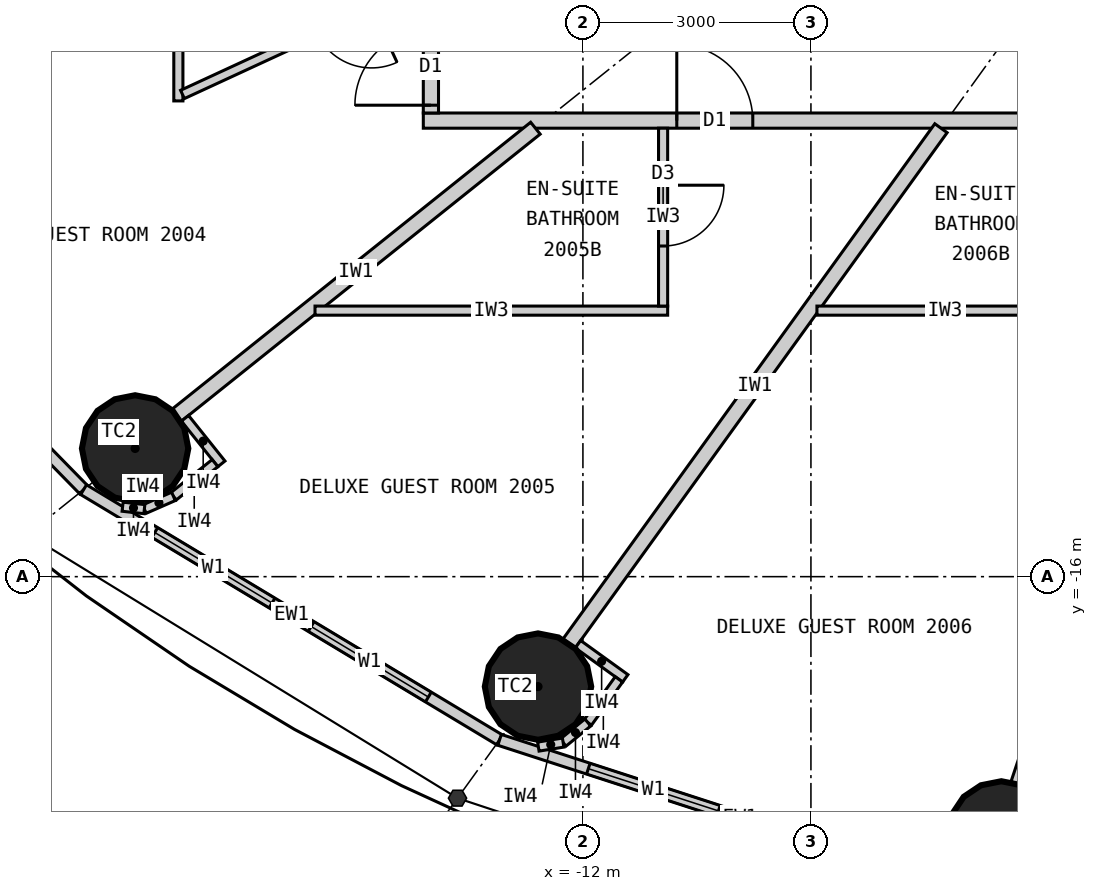
"""IFC4 building model, lengths in metres.
Left out: names, types, materials, properties, quantities, classifications, styles, units other than length and angle.
Written with IfcOpenShell. Run it as: python <this file> out.ifc"""

import sys

from ifc_helpers import new_model, si_unit, direction, frame, frame_2d, origin, origin_2d, place, context, subcontext, project, spatial, rectangle, circle, extrude, element, fill, save


model = new_model("IFC4")
c1 = context("Model", 3, precision=1e-05, world=origin(), true_north=direction((0.0, 1.0)))
c2 = subcontext(c1, "Body", "Model", "MODEL_VIEW")
j1 = project(units=[si_unit("LENGTHUNIT", "METRE"), si_unit("PLANEANGLEUNIT", "RADIAN")], contexts=[c1])
p1 = place(None, origin())
s1 = spatial("IfcSite", under=j1, at=p1, CompositionType="ELEMENT")
p2 = place(p1, origin())
s2 = spatial("IfcBuilding", under=s1, at=p2, CompositionType="ELEMENT")
p3 = place(p2, frame((0.0, 0.0, 80.4)))
s3 = spatial("IfcBuildingStorey", under=s2, at=p3, CompositionType="ELEMENT", Elevation=80.4)
for number, where, z_axis, x_axis in (
    (1, (-17.892, -14.313, 0.0), (0.0, 0.0, 1.0), (1.0, 0.0, 0.0)),
    (2, (-12.591, -17.447, 0.0), (0.0, 0.0, 1.0), (1.0, 0.0, 0.0)),
    (3, (-6.495, -19.391, 0.0), (0.0, 0.0, 1.0), (1.0, 0.0, 0.0)),
):
    element("IfcColumn", number, at=place(p3, frame(where, z_axis=z_axis, x_axis=x_axis)), inside=s3, PredefinedType="COLUMN", context=c2, shape_type="SweptSolid", body=[
        extrude(circle(Radius=0.7, at=origin_2d()), origin(), (0.0, 0.0, 1.0), 3.3),
    ])
p4 = place(p3, frame((-22.803, -10.532, 0.0), z_axis=(0.0, 0.0, 1.0), x_axis=(0.699602905915, -0.714531856557, 0.0)))
e4 = element("IfcWall", 4, at=p4, inside=s3, PredefinedType="ELEMENTEDWALL", context=c2, shape_type="SweptSolid", body=[
    extrude(rectangle(XDim=6.051, YDim=0.15, at=frame_2d((3.025, 0.0))), origin(), (0.0, 0.0, 1.0), 3.12),
])
p5 = place(p4, frame((0.926, 0.0, 0.9)))
e5 = element("IfcOpeningElement", 5, at=p5, cuts=e4, PredefinedType="OPENING", context=c2, shape_type="SweptSolid", body=[
    extrude(rectangle(XDim=1.8, YDim=1.9, at=frame_2d((0.9, 0.95))), frame((0.0, 0.085, 0.0), z_axis=(0.0, -1.0, 0.0), x_axis=(1.0, 0.0, 0.0)), (0.0, 0.0, 1.0), 0.17),
])
p6 = place(p4, frame((3.325, 0.0, 0.9)))
e6 = element("IfcOpeningElement", 6, at=p6, cuts=e4, PredefinedType="OPENING", context=c2, shape_type="SweptSolid", body=[
    extrude(rectangle(XDim=1.8, YDim=1.9, at=frame_2d((0.9, 0.95))), frame((0.0, 0.085, 0.0), z_axis=(0.0, -1.0, 0.0), x_axis=(1.0, 0.0, 0.0)), (0.0, 0.0, 1.0), 0.17),
])
p7 = place(p3, frame((-18.57, -14.856, 0.0), z_axis=(0.0, 0.0, 1.0), x_axis=(0.856983180864, -0.515344377787, 0.0)))
e7 = element("IfcWall", 7, at=p7, inside=s3, PredefinedType="ELEMENTEDWALL", context=c2, shape_type="SweptSolid", body=[
    extrude(rectangle(XDim=6.386, YDim=0.15, at=frame_2d((3.193, 0.0))), origin(), (0.0, 0.0, 1.0), 3.12),
])
p8 = place(p7, frame((1.093, 0.0, 0.9)))
e8 = element("IfcOpeningElement", 8, at=p8, cuts=e7, PredefinedType="OPENING", context=c2, shape_type="SweptSolid", body=[
    extrude(rectangle(XDim=1.8, YDim=1.9, at=frame_2d((0.9, 0.95))), frame((0.0, 0.085, 0.0), z_axis=(0.0, -1.0, 0.0), x_axis=(1.0, 0.0, 0.0)), (0.0, 0.0, 1.0), 0.17),
])
p9 = place(p7, frame((3.493, 0.0, 0.9)))
e9 = element("IfcOpeningElement", 9, at=p9, cuts=e7, PredefinedType="OPENING", context=c2, shape_type="SweptSolid", body=[
    extrude(rectangle(XDim=1.8, YDim=1.9, at=frame_2d((0.9, 0.95))), frame((0.0, 0.085, 0.0), z_axis=(0.0, -1.0, 0.0), x_axis=(1.0, 0.0, 0.0)), (0.0, 0.0, 1.0), 0.17),
])
p10 = place(p3, frame((-13.096, -18.147, 0.0), z_axis=(0.0, 0.0, 1.0), x_axis=(0.951137534625, -0.308767534285, 0.0)))
e10 = element("IfcWall", 10, at=p10, inside=s3, PredefinedType="ELEMENTEDWALL", context=c2, shape_type="SweptSolid", body=[
    extrude(rectangle(XDim=6.655, YDim=0.15, at=frame_2d((3.328, 0.0))), origin(), (0.0, 0.0, 1.0), 3.12),
])
p11 = place(p10, frame((1.228, 0.0, 0.9)))
e11 = element("IfcOpeningElement", 11, at=p11, cuts=e10, PredefinedType="OPENING", context=c2, shape_type="SweptSolid", body=[
    extrude(rectangle(XDim=1.8, YDim=1.9, at=frame_2d((0.9, 0.95))), frame((0.0, 0.085, 0.0), z_axis=(0.0, -1.0, 0.0), x_axis=(1.0, 0.0, 0.0)), (0.0, 0.0, 1.0), 0.17),
])
p12 = place(p10, frame((3.628, 0.0, 0.9)))
e12 = element("IfcOpeningElement", 12, at=p12, cuts=e10, PredefinedType="OPENING", context=c2, shape_type="SweptSolid", body=[
    extrude(rectangle(XDim=1.8, YDim=1.9, at=frame_2d((0.9, 0.95))), frame((0.0, 0.085, 0.0), z_axis=(0.0, -1.0, 0.0), x_axis=(1.0, 0.0, 0.0)), (0.0, 0.0, 1.0), 0.17),
])
p13 = place(p3, frame((14.1, -10.0, 0.0), z_axis=(0.0, 0.0, 1.0), x_axis=(-1.0, 0.0, 0.0)))
e13 = element("IfcWall", 13, at=p13, inside=s3, PredefinedType="PARTITIONING", context=c2, shape_type="SweptSolid", body=[
    extrude(rectangle(XDim=28.2, YDim=0.2, at=frame_2d((14.1, 0.0))), origin(), (0.0, 0.0, 1.0), 3.12),
])
p14 = place(p13, frame((23.865, 0.0, 0.0)))
e14 = element("IfcOpeningElement", 14, at=p14, cuts=e13, PredefinedType="OPENING", context=c2, shape_type="SweptSolid", body=[
    extrude(rectangle(XDim=1.0, YDim=2.2, at=frame_2d((0.5, 1.1))), frame((0.0, 0.11, 0.0), z_axis=(0.0, -1.0, 0.0), x_axis=(1.0, 0.0, 0.0)), (0.0, 0.0, 1.0), 0.22),
])
p15 = place(p13, frame((18.529, 0.0, 0.0)))
e15 = element("IfcOpeningElement", 15, at=p15, cuts=e13, PredefinedType="OPENING", context=c2, shape_type="SweptSolid", body=[
    extrude(rectangle(XDim=1.0, YDim=2.2, at=frame_2d((0.5, 1.1))), frame((0.0, 0.11, 0.0), z_axis=(0.0, -1.0, 0.0), x_axis=(1.0, 0.0, 0.0)), (0.0, 0.0, 1.0), 0.22),
])
p16 = place(p13, frame((14.923, 0.0, 0.0)))
e16 = element("IfcOpeningElement", 16, at=p16, cuts=e13, PredefinedType="OPENING", context=c2, shape_type="SweptSolid", body=[
    extrude(rectangle(XDim=1.0, YDim=2.2, at=frame_2d((0.5, 1.1))), frame((0.0, 0.11, 0.0), z_axis=(0.0, -1.0, 0.0), x_axis=(1.0, 0.0, 0.0)), (0.0, 0.0, 1.0), 0.22),
])
p17 = place(p13, frame((2.801, 0.0, 0.0)))
e17 = element("IfcOpeningElement", 17, at=p17, cuts=e13, PredefinedType="OPENING", context=c2, shape_type="SweptSolid", body=[
    extrude(rectangle(XDim=1.0, YDim=2.2, at=frame_2d((0.5, 1.1))), frame((0.0, 0.11, 0.0), z_axis=(0.0, -1.0, 0.0), x_axis=(1.0, 0.0, 0.0)), (0.0, 0.0, 1.0), 0.22),
])
p18 = place(p3, frame((-14.0, 9.9, 0.0), z_axis=(0.0, 0.0, 1.0), x_axis=(0.0, -1.0, 0.0)))
e18 = element("IfcWall", 18, at=p18, inside=s3, PredefinedType="PARTITIONING", context=c2, shape_type="SweptSolid", body=[
    extrude(rectangle(XDim=19.8, YDim=0.2, at=frame_2d((9.9, 0.0))), origin(), (0.0, 0.0, 1.0), 3.12),
])
p19 = place(p18, frame((7.097, 0.0, 0.0)))
e19 = element("IfcOpeningElement", 19, at=p19, cuts=e18, PredefinedType="OPENING", context=c2, shape_type="SweptSolid", body=[
    extrude(rectangle(XDim=1.0, YDim=2.2, at=frame_2d((0.5, 1.1))), frame((0.0, 0.11, 0.0), z_axis=(0.0, -1.0, 0.0), x_axis=(1.0, 0.0, 0.0)), (0.0, 0.0, 1.0), 0.22),
])
p20 = place(p18, frame((10.778, 0.0, 0.0)))
e20 = element("IfcOpeningElement", 20, at=p20, cuts=e18, PredefinedType="OPENING", context=c2, shape_type="SweptSolid", body=[
    extrude(rectangle(XDim=1.0, YDim=2.2, at=frame_2d((0.5, 1.1))), frame((0.0, 0.11, 0.0), z_axis=(0.0, -1.0, 0.0), x_axis=(1.0, 0.0, 0.0)), (0.0, 0.0, 1.0), 0.22),
])
p21 = place(p18, frame((13.552, 0.0, 0.0)))
e21 = element("IfcOpeningElement", 21, at=p21, cuts=e18, PredefinedType="OPENING", context=c2, shape_type="SweptSolid", body=[
    extrude(rectangle(XDim=1.0, YDim=2.2, at=frame_2d((0.5, 1.1))), frame((0.0, 0.11, 0.0), z_axis=(0.0, -1.0, 0.0), x_axis=(1.0, 0.0, 0.0)), (0.0, 0.0, 1.0), 0.22),
])
p22 = place(p18, frame((18.698, 0.0, 0.0)))
e22 = element("IfcOpeningElement", 22, at=p22, cuts=e18, PredefinedType="OPENING", context=c2, shape_type="SweptSolid", body=[
    extrude(rectangle(XDim=1.0, YDim=2.2, at=frame_2d((0.5, 1.1))), frame((0.0, 0.11, 0.0), z_axis=(0.0, -1.0, 0.0), x_axis=(1.0, 0.0, 0.0)), (0.0, 0.0, 1.0), 0.22),
])
p23 = place(p18, frame((1.877, 0.0, 0.0)))
e23 = element("IfcOpeningElement", 23, at=p23, cuts=e18, PredefinedType="OPENING", context=c2, shape_type="SweptSolid", body=[
    extrude(rectangle(XDim=1.0, YDim=2.2, at=frame_2d((0.5, 1.1))), frame((0.0, 0.11, 0.0), z_axis=(0.0, -1.0, 0.0), x_axis=(1.0, 0.0, 0.0)), (0.0, 0.0, 1.0), 0.22),
])
p24 = place(p3, frame((-14.1, -6.512, 0.0), z_axis=(0.0, 0.0, 1.0), x_axis=(-0.907832871056, -0.419332181247, 0.0)))
e24 = element("IfcWall", 24, at=p24, inside=s3, PredefinedType="PARTITIONING", context=c2, shape_type="SweptSolid", body=[
    extrude(rectangle(XDim=8.023, YDim=0.2, at=frame_2d((4.011, 0.0))), origin(), (0.0, 0.0, 1.0), 2.32),
])
p25 = place(p3, frame((-12.625, -10.1, 0.0), z_axis=(0.0, 0.0, 1.0), x_axis=(-0.780892451574, -0.624665493744, 0.0)))
e25 = element("IfcWall", 25, at=p25, inside=s3, PredefinedType="PARTITIONING", context=c2, shape_type="SweptSolid", body=[
    extrude(rectangle(XDim=6.045, YDim=0.2, at=frame_2d((3.022, 0.0))), origin(), (0.0, 0.0, 1.0), 2.32),
])
p26 = place(p3, frame((-7.289, -10.1, 0.0), z_axis=(0.0, 0.0, 1.0), x_axis=(-0.585198353053, -0.810890182197, 0.0)))
e26 = element("IfcWall", 26, at=p26, inside=s3, PredefinedType="PARTITIONING", context=c2, shape_type="SweptSolid", body=[
    extrude(rectangle(XDim=8.36, YDim=0.2, at=frame_2d((4.18, 0.0))), origin(), (0.0, 0.0, 1.0), 2.32),
])
p27 = place(p3, frame((-3.383, -10.1, 0.0), z_axis=(0.0, 0.0, 1.0), x_axis=(-0.31759592231, -0.948226149256, 0.0)))
e27 = element("IfcWall", 27, at=p27, inside=s3, PredefinedType="PARTITIONING", context=c2, shape_type="SweptSolid", body=[
    extrude(rectangle(XDim=9.098, YDim=0.2, at=frame_2d((4.549, 0.0))), origin(), (0.0, 0.0, 1.0), 2.32),
])
p28 = place(p3, frame((-17.323, -8.101, 0.0), z_axis=(0.0, 0.0, 1.0), x_axis=(0.0, -1.0, 0.0)))
e28 = element("IfcWall", 28, at=p28, inside=s3, PredefinedType="PARTITIONING", context=c2, shape_type="SweptSolid", body=[
    extrude(rectangle(XDim=1.64, YDim=0.12, at=frame_2d((0.82, 0.0))), origin(), (0.0, 0.0, 1.0), 3.12),
])
p29 = place(p3, frame((-14.1, -8.193, 0.0), z_axis=(0.0, 0.0, 1.0), x_axis=(-0.907836493557, -0.419324338628, 0.0)))
e29 = element("IfcWall", 29, at=p29, inside=s3, PredefinedType="PARTITIONING", context=c2, shape_type="SweptSolid", body=[
    extrude(rectangle(XDim=3.49, YDim=0.12, at=frame_2d((1.745, 0.0))), origin(), (0.0, 0.0, 1.0), 3.12),
])
p30 = place(p29, frame((0.75, 0.0, 0.0)))
e30 = element("IfcOpeningElement", 30, at=p30, cuts=e29, PredefinedType="OPENING", context=c2, shape_type="SweptSolid", body=[
    extrude(rectangle(XDim=0.8, YDim=2.1, at=frame_2d((0.4, 1.05))), frame((0.0, 0.07, 0.0), z_axis=(0.0, -1.0, 0.0), x_axis=(1.0, 0.0, 0.0)), (0.0, 0.0, 1.0), 0.14),
])
p31 = place(p3, frame((-15.525, -12.5, 0.0), z_axis=(0.0, 0.0, 1.0), x_axis=(1.0, 0.0, 0.0)))
e31 = element("IfcWall", 31, at=p31, inside=s3, PredefinedType="PARTITIONING", context=c2, shape_type="SweptSolid", body=[
    extrude(rectangle(XDim=4.64, YDim=0.12, at=frame_2d((2.32, 0.0))), origin(), (0.0, 0.0, 1.0), 3.12),
])
p32 = place(p3, frame((-10.945, -10.1, 0.0), z_axis=(0.0, 0.0, 1.0), x_axis=(0.0, -1.0, 0.0)))
e32 = element("IfcWall", 32, at=p32, inside=s3, PredefinedType="PARTITIONING", context=c2, shape_type="SweptSolid", body=[
    extrude(rectangle(XDim=2.34, YDim=0.12, at=frame_2d((1.17, 0.0))), origin(), (0.0, 0.0, 1.0), 3.12),
])
p33 = place(p32, frame((0.75, 0.0, 0.0)))
e33 = element("IfcOpeningElement", 33, at=p33, cuts=e32, PredefinedType="OPENING", context=c2, shape_type="SweptSolid", body=[
    extrude(rectangle(XDim=0.8, YDim=2.1, at=frame_2d((0.4, 1.05))), frame((0.0, 0.07, 0.0), z_axis=(0.0, -1.0, 0.0), x_axis=(1.0, 0.0, 0.0)), (0.0, 0.0, 1.0), 0.14),
])
p34 = place(p3, frame((-8.921, -12.5, 0.0), z_axis=(0.0, 0.0, 1.0), x_axis=(1.0, 0.0, 0.0)))
e34 = element("IfcWall", 34, at=p34, inside=s3, PredefinedType="PARTITIONING", context=c2, shape_type="SweptSolid", body=[
    extrude(rectangle(XDim=3.372, YDim=0.12, at=frame_2d((1.686, 0.0))), origin(), (0.0, 0.0, 1.0), 3.12),
])
p35 = place(p3, frame((-17.236, -13.917, 0.0), z_axis=(0.0, 0.0, 1.0), x_axis=(0.624695047554, -0.780868809443, 0.0)))
e35 = element("IfcWall", 35, at=p35, inside=s3, PredefinedType="PARTITIONING", context=c2, shape_type="SweptSolid", body=[
    extrude(rectangle(XDim=0.768, YDim=0.12, at=frame_2d((0.384, 0.0))), origin(), (0.0, 0.0, 1.0), 3.12),
])
p36 = place(p3, frame((-16.841, -14.507, 0.0), z_axis=(0.0, 0.0, 1.0), x_axis=(-0.780902834923, -0.62465251333, 0.0)))
e36 = element("IfcWall", 36, at=p36, inside=s3, PredefinedType="PARTITIONING", context=c2, shape_type="SweptSolid", body=[
    extrude(rectangle(XDim=0.7, YDim=0.12, at=frame_2d((0.35, 0.0))), origin(), (0.0, 0.0, 1.0), 3.12),
])
p37 = place(p3, frame((-17.387, -14.944, 0.0), z_axis=(0.0, 0.0, 1.0), x_axis=(-0.916036698064, -0.401094462441, 0.0)))
e37 = element("IfcWall", 37, at=p37, inside=s3, PredefinedType="PARTITIONING", context=c2, shape_type="SweptSolid", body=[
    extrude(rectangle(XDim=0.418, YDim=0.12, at=frame_2d((0.209, 0.0))), origin(), (0.0, 0.0, 1.0), 3.12),
])
p38 = place(p3, frame((-17.77, -15.112, 0.0), z_axis=(0.0, 0.0, 1.0), x_axis=(-0.993904401174, 0.110245368731, 0.0)))
e38 = element("IfcWall", 38, at=p38, inside=s3, PredefinedType="PARTITIONING", context=c2, shape_type="SweptSolid", body=[
    extrude(rectangle(XDim=0.288, YDim=0.12, at=frame_2d((0.144, 0.0))), origin(), (0.0, 0.0, 1.0), 3.12),
])
p39 = place(p3, frame((-12.065, -16.889, 0.0), z_axis=(0.0, 0.0, 1.0), x_axis=(0.810821798253, -0.585293098778, 0.0)))
e39 = element("IfcWall", 39, at=p39, inside=s3, PredefinedType="PARTITIONING", context=c2, shape_type="SweptSolid", body=[
    extrude(rectangle(XDim=0.768, YDim=0.12, at=frame_2d((0.384, 0.0))), origin(), (0.0, 0.0, 1.0), 3.12),
])
p40 = place(p3, frame((-11.526, -17.351, 0.0), z_axis=(0.0, 0.0, 1.0), x_axis=(-0.585223113993, -0.810872312296, 0.0)))
e40 = element("IfcWall", 40, at=p40, inside=s3, PredefinedType="PARTITIONING", context=c2, shape_type="SweptSolid", body=[
    extrude(rectangle(XDim=0.7, YDim=0.12, at=frame_2d((0.35, 0.0))), origin(), (0.0, 0.0, 1.0), 3.12),
])
p41 = place(p3, frame((-11.936, -17.919, 0.0), z_axis=(0.0, 0.0, 1.0), x_axis=(-0.775023088441, -0.631932917629, 0.0)))
e41 = element("IfcWall", 41, at=p41, inside=s3, PredefinedType="PARTITIONING", context=c2, shape_type="SweptSolid", body=[
    extrude(rectangle(XDim=0.418, YDim=0.12, at=frame_2d((0.209, 0.0))), origin(), (0.0, 0.0, 1.0), 3.12),
])
p42 = place(p3, frame((-12.26, -18.183, 0.0), z_axis=(0.0, 0.0, 1.0), x_axis=(-0.987218661664, -0.159371622511, 0.0)))
e42 = element("IfcWall", 42, at=p42, inside=s3, PredefinedType="PARTITIONING", context=c2, shape_type="SweptSolid", body=[
    extrude(rectangle(XDim=0.331, YDim=0.12, at=frame_2d((0.166, 0.0))), origin(), (0.0, 0.0, 1.0), 3.12),
])
p43 = place(p8, origin())
e43 = element("IfcWindow", 43, at=p43, inside=s3, PartitioningType="SINGLE_PANEL", PredefinedType="WINDOW", context=c2, shape_type="SweptSolid", body=[
    extrude(rectangle(XDim=1.8, YDim=1.9, at=frame_2d((0.9, 0.95))), frame((0.0, 0.03, 0.0), z_axis=(0.0, -1.0, 0.0), x_axis=(1.0, 0.0, 0.0)), (0.0, 0.0, 1.0), 0.06),
])
fill(e8, e43)
p44 = place(p9, origin())
e44 = element("IfcWindow", 44, at=p44, inside=s3, PartitioningType="SINGLE_PANEL", PredefinedType="WINDOW", context=c2, shape_type="SweptSolid", body=[
    extrude(rectangle(XDim=1.8, YDim=1.9, at=frame_2d((0.9, 0.95))), frame((0.0, 0.03, 0.0), z_axis=(0.0, -1.0, 0.0), x_axis=(1.0, 0.0, 0.0)), (0.0, 0.0, 1.0), 0.06),
])
fill(e9, e44)
p45 = place(p11, origin())
e45 = element("IfcWindow", 45, at=p45, inside=s3, PartitioningType="SINGLE_PANEL", PredefinedType="WINDOW", context=c2, shape_type="SweptSolid", body=[
    extrude(rectangle(XDim=1.8, YDim=1.9, at=frame_2d((0.9, 0.95))), frame((0.0, 0.03, 0.0), z_axis=(0.0, -1.0, 0.0), x_axis=(1.0, 0.0, 0.0)), (0.0, 0.0, 1.0), 0.06),
])
fill(e11, e45)
p46 = place(p22, origin())
e46 = element("IfcDoor", 46, at=p46, inside=s3, OperationType="SINGLE_SWING_RIGHT", PredefinedType="DOOR", context=c2, shape_type="SweptSolid", body=[
    extrude(rectangle(XDim=1.0, YDim=2.2, at=frame_2d((0.5, 1.1))), frame((0.0, 0.025, 0.0), z_axis=(0.0, -1.0, 0.0), x_axis=(1.0, 0.0, 0.0)), (0.0, 0.0, 1.0), 0.05),
])
fill(e22, e46)
p47 = place(p33, origin())
e47 = element("IfcDoor", 47, at=p47, inside=s3, OperationType="SINGLE_SWING_LEFT", PredefinedType="DOOR", context=c2, shape_type="SweptSolid", body=[
    extrude(rectangle(XDim=0.8, YDim=2.1, at=frame_2d((0.4, 1.05))), frame((0.0, 0.025, 0.0), z_axis=(0.0, -1.0, 0.0), x_axis=(1.0, 0.0, 0.0)), (0.0, 0.0, 1.0), 0.05),
])
fill(e33, e47)
p48 = place(p14, origin())
e48 = element("IfcDoor", 48, at=p48, inside=s3, OperationType="SINGLE_SWING_RIGHT", PredefinedType="DOOR", context=c2, shape_type="SweptSolid", body=[
    extrude(rectangle(XDim=1.0, YDim=2.2, at=frame_2d((0.5, 1.1))), frame((0.0, 0.025, 0.0), z_axis=(0.0, -1.0, 0.0), x_axis=(1.0, 0.0, 0.0)), (0.0, 0.0, 1.0), 0.05),
])
fill(e14, e48)
save(model, sys.argv[1])
